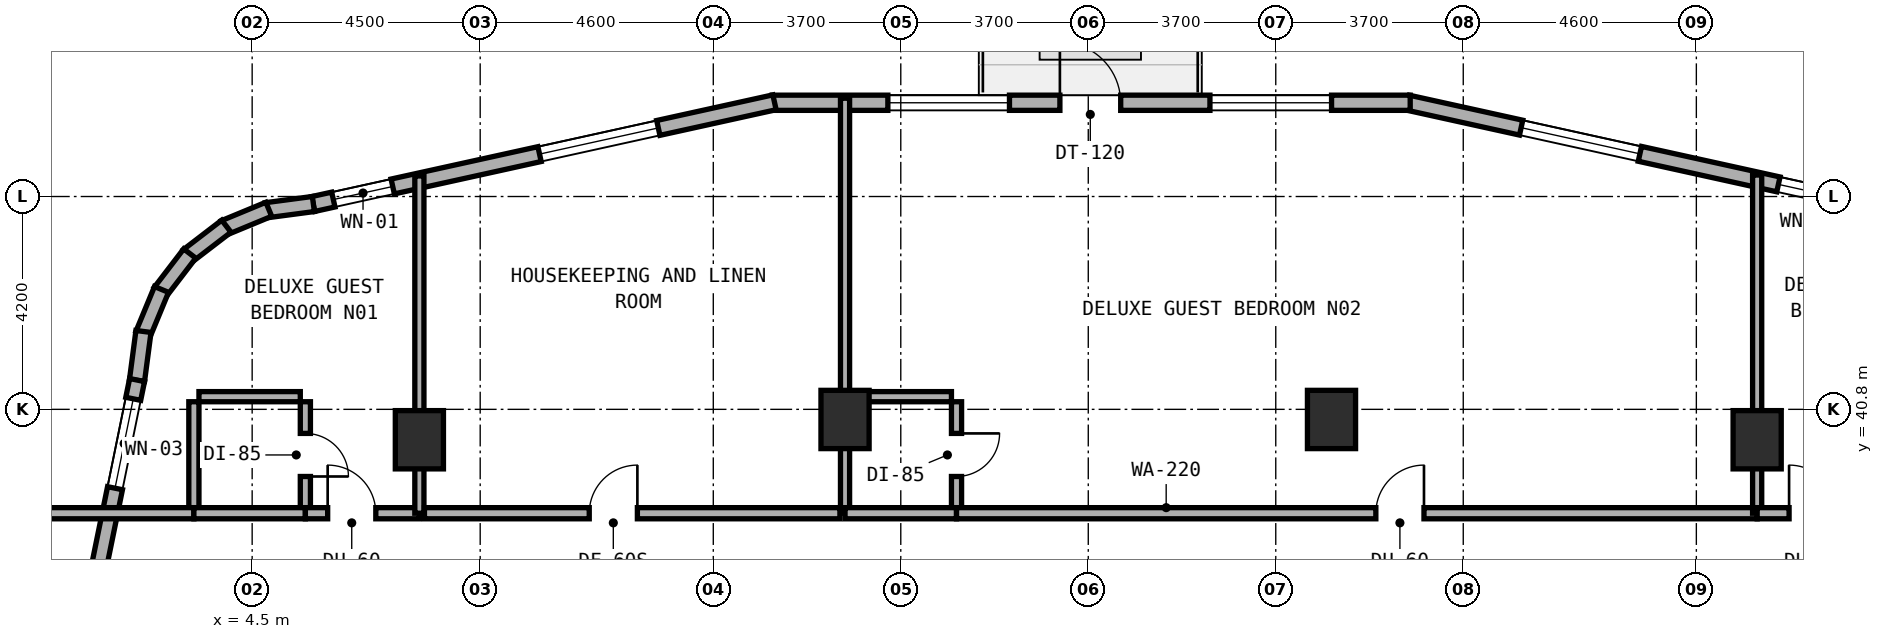
"""IFC4 building model, lengths in metres.
Left out: names, types, materials, properties, quantities, classifications, styles, units other than length and angle.
Written with IfcOpenShell. Run it as: python <this file> out.ifc"""

import sys

from ifc_helpers import new_model, si_unit, direction, frame, frame_2d, origin, origin_2d, place, context, subcontext, project, spatial, rectangle, extrude, element, fill, save


model = new_model("IFC4")
c1 = context("Model", 3, precision=1e-05, world=origin(), true_north=direction((0.0, 1.0)))
c2 = subcontext(c1, "Body", "Model", "MODEL_VIEW")
j1 = project(units=[si_unit("LENGTHUNIT", "METRE"), si_unit("PLANEANGLEUNIT", "RADIAN")], contexts=[c1])
p1 = place(None, origin())
s1 = spatial("IfcSite", under=j1, at=p1, CompositionType="ELEMENT")
p2 = place(p1, origin())
s2 = spatial("IfcBuilding", under=s1, at=p2, CompositionType="ELEMENT")
p3 = place(p2, frame((0.0, 0.0, 69.5)))
s3 = spatial("IfcBuildingStorey", under=s2, at=p3, CompositionType="ELEMENT", Elevation=69.5)
for number, where, z_axis, x_axis in (
    (1, (16.2, 40.6, 0.0), (0.0, 0.0, 1.0), (1.0, 0.0, 0.0)),
    (2, (25.8, 40.6, 0.0), (0.0, 0.0, 1.0), (1.0, 0.0, 0.0)),
    (3, (34.2, 40.2, 0.0), (0.0, 0.0, 1.0), (1.0, 0.0, 0.0)),
    (4, (7.8, 40.2, 0.0), (0.0, 0.0, 1.0), (1.0, 0.0, 0.0)),
):
    element("IfcColumn", number, at=place(p3, frame(where, z_axis=z_axis, x_axis=x_axis)), inside=s3, PredefinedType="COLUMN", context=c2, shape_type="SweptSolid", body=[
        extrude(rectangle(XDim=0.95, YDim=1.15, at=origin_2d()), origin(), (0.0, 0.0, 1.0), 3.5),
    ])
p4 = place(p3, frame((36.376, 44.852, 0.0), z_axis=(0.0, 0.0, 1.0), x_axis=(-0.976540764801, 0.215332614068, 0.0)))
e5 = element("IfcWall", 5, at=p4, inside=s3, PredefinedType="STANDARD", context=c2, shape_type="SweptSolid", body=[
    extrude(rectangle(XDim=9.288, YDim=0.3, at=frame_2d((4.644, 0.0))), origin(), (0.0, 0.0, 1.0), 3.22),
])
p5 = place(p4, frame((0.299, 0.0, 0.85)))
e6 = element("IfcOpeningElement", 6, at=p5, cuts=e5, PredefinedType="OPENING", context=c2, shape_type="SweptSolid", body=[
    extrude(rectangle(XDim=1.5, YDim=1.5, at=frame_2d((0.75, 0.75))), frame((0.0, 0.16, 0.0), z_axis=(0.0, -1.0, 0.0), x_axis=(1.0, 0.0, 0.0)), (0.0, 0.0, 1.0), 0.32),
])
p6 = place(p4, frame((4.598, 0.0, 0.8)))
e7 = element("IfcOpeningElement", 7, at=p6, cuts=e5, PredefinedType="OPENING", context=c2, shape_type="SweptSolid", body=[
    extrude(rectangle(XDim=2.4, YDim=1.6, at=frame_2d((1.2, 0.8))), frame((0.0, 0.16, 0.0), z_axis=(0.0, -1.0, 0.0), x_axis=(1.0, 0.0, 0.0)), (0.0, 0.0, 1.0), 0.32),
])
p7 = place(p3, frame((27.353, 46.85, 0.0), z_axis=(0.0, 0.0, 1.0), x_axis=(-1.0, 0.0, 0.0)))
e8 = element("IfcWall", 8, at=p7, inside=s3, PredefinedType="STANDARD", context=c2, shape_type="SweptSolid", body=[
    extrude(rectangle(XDim=12.591, YDim=0.3, at=frame_2d((6.295, 0.0))), origin(), (0.0, 0.0, 1.0), 3.22),
])
p8 = place(p7, frame((5.713, 0.0, 0.0)))
e9 = element("IfcOpeningElement", 9, at=p8, cuts=e8, PredefinedType="OPENING", context=c2, shape_type="SweptSolid", body=[
    extrude(rectangle(XDim=1.2, YDim=2.15, at=frame_2d((0.6, 1.075))), frame((0.0, 0.16, 0.0), z_axis=(0.0, -1.0, 0.0), x_axis=(1.0, 0.0, 0.0)), (0.0, 0.0, 1.0), 0.32),
])
p9 = place(p7, frame((1.552, 0.0, 0.8)))
e10 = element("IfcOpeningElement", 10, at=p9, cuts=e8, PredefinedType="OPENING", context=c2, shape_type="SweptSolid", body=[
    extrude(rectangle(XDim=2.4, YDim=1.6, at=frame_2d((1.2, 0.8))), frame((0.0, 0.16, 0.0), z_axis=(0.0, -1.0, 0.0), x_axis=(1.0, 0.0, 0.0)), (0.0, 0.0, 1.0), 0.32),
])
p10 = place(p7, frame((7.908, 0.0, 0.8)))
e11 = element("IfcOpeningElement", 11, at=p10, cuts=e8, PredefinedType="OPENING", context=c2, shape_type="SweptSolid", body=[
    extrude(rectangle(XDim=2.4, YDim=1.6, at=frame_2d((1.2, 0.8))), frame((0.0, 0.16, 0.0), z_axis=(0.0, -1.0, 0.0), x_axis=(1.0, 0.0, 0.0)), (0.0, 0.0, 1.0), 0.32),
])
p11 = place(p3, frame((14.808, 46.859, 0.0), z_axis=(0.0, 0.0, 1.0), x_axis=(-0.976555357219, -0.21526642629, 0.0)))
e12 = element("IfcWall", 12, at=p11, inside=s3, PredefinedType="STANDARD", context=c2, shape_type="SweptSolid", body=[
    extrude(rectangle(XDim=9.323, YDim=0.3, at=frame_2d((4.661, 0.0))), origin(), (0.0, 0.0, 1.0), 3.22),
])
p12 = place(p11, frame((2.348, 0.0, 0.8)))
e13 = element("IfcOpeningElement", 13, at=p12, cuts=e12, PredefinedType="OPENING", context=c2, shape_type="SweptSolid", body=[
    extrude(rectangle(XDim=2.4, YDim=1.6, at=frame_2d((1.2, 0.8))), frame((0.0, 0.16, 0.0), z_axis=(0.0, -1.0, 0.0), x_axis=(1.0, 0.0, 0.0)), (0.0, 0.0, 1.0), 0.32),
])
p13 = place(p11, frame((7.715, 0.0, 0.85)))
e14 = element("IfcOpeningElement", 14, at=p13, cuts=e12, PredefinedType="OPENING", context=c2, shape_type="SweptSolid", body=[
    extrude(rectangle(XDim=1.2, YDim=1.5, at=frame_2d((0.6, 0.75))), frame((0.0, 0.16, 0.0), z_axis=(0.0, -1.0, 0.0), x_axis=(1.0, 0.0, 0.0)), (0.0, 0.0, 1.0), 0.32),
])
p14 = place(p3, frame((5.708, 44.852, 0.0), z_axis=(0.0, 0.0, 1.0), x_axis=(-0.991359246108, -0.131174864804, 0.0)))
e15 = element("IfcWall", 15, at=p14, inside=s3, PredefinedType="STANDARD", context=c2, shape_type="SweptSolid", body=[
    extrude(rectangle(XDim=0.938, YDim=0.3, at=frame_2d((0.469, 0.0))), origin(), (0.0, 0.0, 1.0), 3.22),
])
p15 = place(p3, frame((4.828, 44.748, 0.0), z_axis=(0.0, 0.0, 1.0), x_axis=(-0.923982547689, -0.382434636986, 0.0)))
e16 = element("IfcWall", 16, at=p15, inside=s3, PredefinedType="STANDARD", context=c2, shape_type="SweptSolid", body=[
    extrude(rectangle(XDim=0.954, YDim=0.3, at=frame_2d((0.477, 0.0))), origin(), (0.0, 0.0, 1.0), 3.22),
])
for number, where, z_axis, x_axis in (
    (17, (3.991, 44.414, 0.0), (0.0, 0.0, 1.0), (-0.794, -0.608, 0.0)),
    (18, (3.268, 43.875, 0.0), (0.0, 0.0, 1.0), (-0.608, -0.794, 0.0)),
):
    element("IfcWall", number, at=place(p3, frame(where, z_axis=z_axis, x_axis=x_axis)), inside=s3, PredefinedType="STANDARD", context=c2, shape_type="SweptSolid", body=[
        extrude(rectangle(XDim=0.955, YDim=0.3, at=frame_2d((0.478, 0.0))), origin(), (0.0, 0.0, 1.0), 3.22),
    ])
p16 = place(p3, frame((2.711, 43.166, 0.0), z_axis=(0.0, 0.0, 1.0), x_axis=(-0.382344263057, -0.924019948111, 0.0)))
e19 = element("IfcWall", 19, at=p16, inside=s3, PredefinedType="STANDARD", context=c2, shape_type="SweptSolid", body=[
    extrude(rectangle(XDim=0.955, YDim=0.3, at=frame_2d((0.477, 0.0))), origin(), (0.0, 0.0, 1.0), 3.22),
])
p17 = place(p3, frame((2.355, 42.337, 0.0), z_axis=(0.0, 0.0, 1.0), x_axis=(-0.130454512571, -0.991454295543, 0.0)))
e20 = element("IfcWall", 20, at=p17, inside=s3, PredefinedType="STANDARD", context=c2, shape_type="SweptSolid", body=[
    extrude(rectangle(XDim=0.973, YDim=0.3, at=frame_2d((0.487, 0.0))), origin(), (0.0, 0.0, 1.0), 3.22),
])
p18 = place(p3, frame((2.229, 41.378, 0.0), z_axis=(0.0, 0.0, 1.0), x_axis=(-0.199990901713, -0.979797754249, 0.0)))
e21 = element("IfcWall", 21, at=p18, inside=s3, PredefinedType="STANDARD", context=c2, shape_type="SweptSolid", body=[
    extrude(rectangle(XDim=10.065, YDim=0.3, at=frame_2d((5.033, 0.0))), origin(), (0.0, 0.0, 1.0), 3.22),
])
p19 = place(p18, frame((0.378, 0.0, 0.85)))
e22 = element("IfcOpeningElement", 22, at=p19, cuts=e21, PredefinedType="OPENING", context=c2, shape_type="SweptSolid", body=[
    extrude(rectangle(XDim=1.8, YDim=1.5, at=frame_2d((0.9, 0.75))), frame((0.0, 0.16, 0.0), z_axis=(0.0, -1.0, 0.0), x_axis=(1.0, 0.0, 0.0)), (0.0, 0.0, 1.0), 0.32),
])
p20 = place(p18, frame((5.236, 0.0, 0.8)))
e23 = element("IfcOpeningElement", 23, at=p20, cuts=e21, PredefinedType="OPENING", context=c2, shape_type="SweptSolid", body=[
    extrude(rectangle(XDim=2.4, YDim=1.6, at=frame_2d((1.2, 0.8))), frame((0.0, 0.16, 0.0), z_axis=(0.0, -1.0, 0.0), x_axis=(1.0, 0.0, 0.0)), (0.0, 0.0, 1.0), 0.32),
])
p21 = place(p3, frame((5.55, 38.85, 0.0), z_axis=(0.0, 0.0, 1.0), x_axis=(0.0, 1.0, 0.0)))
e24 = element("IfcWall", 24, at=p21, inside=s3, PredefinedType="PLUMBINGWALL", context=c2, shape_type="SweptSolid", body=[
    extrude(rectangle(XDim=2.1, YDim=0.2, at=frame_2d((1.05, 0.0))), origin(), (0.0, 0.0, 1.0), 3.22),
])
p22 = place(p21, frame((0.625, 0.0, 0.0)))
e25 = element("IfcOpeningElement", 25, at=p22, cuts=e24, PredefinedType="OPENING", context=c2, shape_type="SweptSolid", body=[
    extrude(rectangle(XDim=0.85, YDim=2.1, at=frame_2d((0.425, 1.05))), frame((0.0, 0.11, 0.0), z_axis=(0.0, -1.0, 0.0), x_axis=(1.0, 0.0, 0.0)), (0.0, 0.0, 1.0), 0.22),
])
p23 = place(p3, frame((3.45, 41.05, 0.0), z_axis=(0.0, 0.0, 1.0), x_axis=(1.0, 0.0, 0.0)))
e26 = element("IfcWall", 26, at=p23, inside=s3, PredefinedType="PLUMBINGWALL", context=c2, shape_type="SweptSolid", body=[
    extrude(rectangle(XDim=2.0, YDim=0.2, at=frame_2d((1.0, 0.0))), origin(), (0.0, 0.0, 1.0), 3.22),
])
p24 = place(p3, frame((3.35, 38.85, 0.0), z_axis=(0.0, 0.0, 1.0), x_axis=(0.0, 1.0, 0.0)))
e27 = element("IfcWall", 27, at=p24, inside=s3, PredefinedType="PLUMBINGWALL", context=c2, shape_type="SweptSolid", body=[
    extrude(rectangle(XDim=2.1, YDim=0.2, at=frame_2d((1.05, 0.0))), origin(), (0.0, 0.0, 1.0), 3.22),
])
p25 = place(p3, frame((0.24, 38.75, 0.0), z_axis=(0.0, 0.0, 1.0), x_axis=(1.0, 0.0, 0.0)))
e28 = element("IfcWall", 28, at=p25, inside=s3, PredefinedType="SOLIDWALL", context=c2, shape_type="SweptSolid", body=[
    extrude(rectangle(XDim=3.11, YDim=0.22, at=frame_2d((1.555, 0.0))), origin(), (0.0, 0.0, 1.0), 3.22),
])
p26 = place(p3, frame((3.35, 38.75, 0.0), z_axis=(0.0, 0.0, 1.0), x_axis=(1.0, 0.0, 0.0)))
e29 = element("IfcWall", 29, at=p26, inside=s3, PredefinedType="SOLIDWALL", context=c2, shape_type="SweptSolid", body=[
    extrude(rectangle(XDim=2.2, YDim=0.22, at=frame_2d((1.1, 0.0))), origin(), (0.0, 0.0, 1.0), 3.22),
])
p27 = place(p3, frame((5.55, 38.75, 0.0), z_axis=(0.0, 0.0, 1.0), x_axis=(1.0, 0.0, 0.0)))
e30 = element("IfcWall", 30, at=p27, inside=s3, PredefinedType="SOLIDWALL", context=c2, shape_type="SweptSolid", body=[
    extrude(rectangle(XDim=2.25, YDim=0.22, at=frame_2d((1.125, 0.0))), origin(), (0.0, 0.0, 1.0), 2.495),
])
p28 = place(p27, frame((0.44, 0.0, 0.0)))
e31 = element("IfcOpeningElement", 31, at=p28, cuts=e30, PredefinedType="OPENING", context=c2, shape_type="SweptSolid", body=[
    extrude(rectangle(XDim=0.95, YDim=2.1, at=frame_2d((0.475, 1.05))), frame((0.0, 0.12, 0.0), z_axis=(0.0, -1.0, 0.0), x_axis=(1.0, 0.0, 0.0)), (0.0, 0.0, 1.0), 0.24),
])
p29 = place(p3, frame((7.8, 38.75, 0.0), z_axis=(0.0, 0.0, 1.0), x_axis=(0.0, 1.0, 0.0)))
e32 = element("IfcWall", 32, at=p29, inside=s3, PredefinedType="SOLIDWALL", context=c2, shape_type="SweptSolid", body=[
    extrude(rectangle(XDim=6.656, YDim=0.18, at=frame_2d((3.328, 0.0))), origin(), (0.0, 0.0, 1.0), 2.495),
])
p30 = place(p3, frame((7.9, 38.75, 0.0), z_axis=(0.0, 0.0, 1.0), x_axis=(1.0, 0.0, 0.0)))
e33 = element("IfcWall", 33, at=p30, inside=s3, PredefinedType="SOLIDWALL", context=c2, shape_type="SweptSolid", body=[
    extrude(rectangle(XDim=8.2, YDim=0.22, at=frame_2d((4.1, 0.0))), origin(), (0.0, 0.0, 1.0), 2.925),
])
p31 = place(p30, frame((3.252, 0.0, 0.0)))
e34 = element("IfcOpeningElement", 34, at=p31, cuts=e33, PredefinedType="OPENING", context=c2, shape_type="SweptSolid", body=[
    extrude(rectangle(XDim=0.95, YDim=2.1, at=frame_2d((0.475, 1.05))), frame((0.0, 0.12, 0.0), z_axis=(0.0, -1.0, 0.0), x_axis=(1.0, 0.0, 0.0)), (0.0, 0.0, 1.0), 0.24),
])
p32 = place(p3, frame((16.2, 38.75, 0.0), z_axis=(0.0, 0.0, 1.0), x_axis=(0.0, 1.0, 0.0)))
e35 = element("IfcWall", 35, at=p32, inside=s3, PredefinedType="SOLIDWALL", context=c2, shape_type="SweptSolid", body=[
    extrude(rectangle(XDim=8.19, YDim=0.18, at=frame_2d((4.095, 0.0))), origin(), (0.0, 0.0, 1.0), 2.495),
])
p33 = place(p3, frame((18.4, 38.85, 0.0), z_axis=(0.0, 0.0, 1.0), x_axis=(0.0, 1.0, 0.0)))
e36 = element("IfcWall", 36, at=p33, inside=s3, PredefinedType="PLUMBINGWALL", context=c2, shape_type="SweptSolid", body=[
    extrude(rectangle(XDim=2.1, YDim=0.2, at=frame_2d((1.05, 0.0))), origin(), (0.0, 0.0, 1.0), 2.745),
])
p34 = place(p33, frame((0.625, 0.0, 0.0)))
e37 = element("IfcOpeningElement", 37, at=p34, cuts=e36, PredefinedType="OPENING", context=c2, shape_type="SweptSolid", body=[
    extrude(rectangle(XDim=0.85, YDim=2.1, at=frame_2d((0.425, 1.05))), frame((0.0, 0.11, 0.0), z_axis=(0.0, -1.0, 0.0), x_axis=(1.0, 0.0, 0.0)), (0.0, 0.0, 1.0), 0.22),
])
p35 = place(p3, frame((16.3, 41.05, 0.0), z_axis=(0.0, 0.0, 1.0), x_axis=(1.0, 0.0, 0.0)))
e38 = element("IfcWall", 38, at=p35, inside=s3, PredefinedType="PLUMBINGWALL", context=c2, shape_type="SweptSolid", body=[
    extrude(rectangle(XDim=2.0, YDim=0.2, at=frame_2d((1.0, 0.0))), origin(), (0.0, 0.0, 1.0), 3.22),
])
p36 = place(p3, frame((16.2, 38.75, 0.0), z_axis=(0.0, 0.0, 1.0), x_axis=(1.0, 0.0, 0.0)))
e39 = element("IfcWall", 39, at=p36, inside=s3, PredefinedType="SOLIDWALL", context=c2, shape_type="SweptSolid", body=[
    extrude(rectangle(XDim=2.2, YDim=0.22, at=frame_2d((1.1, 0.0))), origin(), (0.0, 0.0, 1.0), 2.495),
])
p37 = place(p3, frame((18.4, 38.75, 0.0), z_axis=(0.0, 0.0, 1.0), x_axis=(1.0, 0.0, 0.0)))
e40 = element("IfcWall", 40, at=p37, inside=s3, PredefinedType="SOLIDWALL", context=c2, shape_type="SweptSolid", body=[
    extrude(rectangle(XDim=15.8, YDim=0.22, at=frame_2d((7.9, 0.0))), origin(), (0.0, 0.0, 1.0), 2.495),
])
p38 = place(p37, frame((8.275, 0.0, 0.0)))
e41 = element("IfcOpeningElement", 41, at=p38, cuts=e40, PredefinedType="OPENING", context=c2, shape_type="SweptSolid", body=[
    extrude(rectangle(XDim=0.95, YDim=2.1, at=frame_2d((0.475, 1.05))), frame((0.0, 0.12, 0.0), z_axis=(0.0, -1.0, 0.0), x_axis=(1.0, 0.0, 0.0)), (0.0, 0.0, 1.0), 0.24),
])
p39 = place(p3, frame((34.2, 38.75, 0.0), z_axis=(0.0, 0.0, 1.0), x_axis=(0.0, 1.0, 0.0)))
e42 = element("IfcWall", 42, at=p39, inside=s3, PredefinedType="SOLIDWALL", context=c2, shape_type="SweptSolid", body=[
    extrude(rectangle(XDim=6.674, YDim=0.18, at=frame_2d((3.337, 0.0))), origin(), (0.0, 0.0, 1.0), 2.495),
])
p40 = place(p3, frame((34.2, 38.75, 0.0), z_axis=(0.0, 0.0, 1.0), x_axis=(1.0, 0.0, 0.0)))
e43 = element("IfcWall", 43, at=p40, inside=s3, PredefinedType="SOLIDWALL", context=c2, shape_type="SweptSolid", body=[
    extrude(rectangle(XDim=2.25, YDim=0.22, at=frame_2d((1.125, 0.0))), origin(), (0.0, 0.0, 1.0), 2.495),
])
p41 = place(p40, frame((0.63, 0.0, 0.0)))
e44 = element("IfcOpeningElement", 44, at=p41, cuts=e43, PredefinedType="OPENING", context=c2, shape_type="SweptSolid", body=[
    extrude(rectangle(XDim=0.95, YDim=2.1, at=frame_2d((0.475, 1.05))), frame((0.0, 0.12, 0.0), z_axis=(0.0, -1.0, 0.0), x_axis=(1.0, 0.0, 0.0)), (0.0, 0.0, 1.0), 0.24),
])
p42 = place(p5, origin())
e45 = element("IfcWindow", 45, at=p42, inside=s3, PartitioningType="SINGLE_PANEL", PredefinedType="WINDOW", context=c2, shape_type="SweptSolid", body=[
    extrude(rectangle(XDim=1.5, YDim=1.5, at=frame_2d((0.75, 0.75))), frame((0.0, 0.03, 0.0), z_axis=(0.0, -1.0, 0.0), x_axis=(1.0, 0.0, 0.0)), (0.0, 0.0, 1.0), 0.06),
])
fill(e6, e45)
p43 = place(p6, origin())
e46 = element("IfcWindow", 46, at=p43, inside=s3, PartitioningType="SINGLE_PANEL", PredefinedType="WINDOW", context=c2, shape_type="SweptSolid", body=[
    extrude(rectangle(XDim=2.4, YDim=1.6, at=frame_2d((1.2, 0.8))), frame((0.0, 0.03, 0.0), z_axis=(0.0, -1.0, 0.0), x_axis=(1.0, 0.0, 0.0)), (0.0, 0.0, 1.0), 0.06),
])
fill(e7, e46)
p44 = place(p8, frame((1.2, 0.0, 0.0), z_axis=(0.0, 0.0, 1.0), x_axis=(-1.0, 0.0, 0.0)))
e47 = element("IfcDoor", 47, at=p44, inside=s3, OperationType="SINGLE_SWING_LEFT", PredefinedType="DOOR", context=c2, shape_type="SweptSolid", body=[
    extrude(rectangle(XDim=1.2, YDim=2.15, at=frame_2d((0.6, 1.075))), frame((0.0, 0.025, 0.0), z_axis=(0.0, -1.0, 0.0), x_axis=(1.0, 0.0, 0.0)), (0.0, 0.0, 1.0), 0.05),
])
fill(e9, e47)
p45 = place(p9, origin())
e48 = element("IfcWindow", 48, at=p45, inside=s3, PartitioningType="SINGLE_PANEL", PredefinedType="WINDOW", context=c2, shape_type="SweptSolid", body=[
    extrude(rectangle(XDim=2.4, YDim=1.6, at=frame_2d((1.2, 0.8))), frame((0.0, 0.03, 0.0), z_axis=(0.0, -1.0, 0.0), x_axis=(1.0, 0.0, 0.0)), (0.0, 0.0, 1.0), 0.06),
])
fill(e10, e48)
p46 = place(p10, origin())
e49 = element("IfcWindow", 49, at=p46, inside=s3, PartitioningType="SINGLE_PANEL", PredefinedType="WINDOW", context=c2, shape_type="SweptSolid", body=[
    extrude(rectangle(XDim=2.4, YDim=1.6, at=frame_2d((1.2, 0.8))), frame((0.0, 0.03, 0.0), z_axis=(0.0, -1.0, 0.0), x_axis=(1.0, 0.0, 0.0)), (0.0, 0.0, 1.0), 0.06),
])
fill(e11, e49)
p47 = place(p12, origin())
e50 = element("IfcWindow", 50, at=p47, inside=s3, PartitioningType="SINGLE_PANEL", PredefinedType="WINDOW", context=c2, shape_type="SweptSolid", body=[
    extrude(rectangle(XDim=2.4, YDim=1.6, at=frame_2d((1.2, 0.8))), frame((0.0, 0.03, 0.0), z_axis=(0.0, -1.0, 0.0), x_axis=(1.0, 0.0, 0.0)), (0.0, 0.0, 1.0), 0.06),
])
fill(e13, e50)
p48 = place(p13, origin())
e51 = element("IfcWindow", 51, at=p48, inside=s3, PartitioningType="SINGLE_PANEL", PredefinedType="WINDOW", context=c2, shape_type="SweptSolid", body=[
    extrude(rectangle(XDim=1.2, YDim=1.5, at=frame_2d((0.6, 0.75))), frame((0.0, 0.03, 0.0), z_axis=(0.0, -1.0, 0.0), x_axis=(1.0, 0.0, 0.0)), (0.0, 0.0, 1.0), 0.06),
])
fill(e14, e51)
p49 = place(p19, origin())
e52 = element("IfcWindow", 52, at=p49, inside=s3, PartitioningType="SINGLE_PANEL", PredefinedType="WINDOW", context=c2, shape_type="SweptSolid", body=[
    extrude(rectangle(XDim=1.8, YDim=1.5, at=frame_2d((0.9, 0.75))), frame((0.0, 0.03, 0.0), z_axis=(0.0, -1.0, 0.0), x_axis=(1.0, 0.0, 0.0)), (0.0, 0.0, 1.0), 0.06),
])
fill(e22, e52)
p50 = place(p22, frame((0.85, 0.0, 0.0), z_axis=(0.0, 0.0, 1.0), x_axis=(-1.0, 0.0, 0.0)))
e53 = element("IfcDoor", 53, at=p50, inside=s3, OperationType="SINGLE_SWING_RIGHT", PredefinedType="DOOR", context=c2, shape_type="SweptSolid", body=[
    extrude(rectangle(XDim=0.85, YDim=2.1, at=frame_2d((0.425, 1.05))), frame((0.0, 0.025, 0.0), z_axis=(0.0, -1.0, 0.0), x_axis=(1.0, 0.0, 0.0)), (0.0, 0.0, 1.0), 0.05),
])
fill(e25, e53)
p51 = place(p28, origin())
e54 = element("IfcDoor", 54, at=p51, inside=s3, OperationType="SINGLE_SWING_LEFT", PredefinedType="DOOR", context=c2, shape_type="SweptSolid", body=[
    extrude(rectangle(XDim=0.95, YDim=2.1, at=frame_2d((0.475, 1.05))), frame((0.0, 0.025, 0.0), z_axis=(0.0, -1.0, 0.0), x_axis=(1.0, 0.0, 0.0)), (0.0, 0.0, 1.0), 0.05),
])
fill(e31, e54)
p52 = place(p31, origin())
e55 = element("IfcDoor", 55, at=p52, inside=s3, OperationType="SINGLE_SWING_RIGHT", PredefinedType="DOOR", context=c2, shape_type="SweptSolid", body=[
    extrude(rectangle(XDim=0.95, YDim=2.1, at=frame_2d((0.475, 1.05))), frame((0.0, 0.025, 0.0), z_axis=(0.0, -1.0, 0.0), x_axis=(1.0, 0.0, 0.0)), (0.0, 0.0, 1.0), 0.05),
])
fill(e34, e55)
p53 = place(p34, frame((0.85, 0.0, 0.0), z_axis=(0.0, 0.0, 1.0), x_axis=(-1.0, 0.0, 0.0)))
e56 = element("IfcDoor", 56, at=p53, inside=s3, OperationType="SINGLE_SWING_LEFT", PredefinedType="DOOR", context=c2, shape_type="SweptSolid", body=[
    extrude(rectangle(XDim=0.85, YDim=2.1, at=frame_2d((0.425, 1.05))), frame((0.0, 0.025, 0.0), z_axis=(0.0, -1.0, 0.0), x_axis=(1.0, 0.0, 0.0)), (0.0, 0.0, 1.0), 0.05),
])
fill(e37, e56)
p54 = place(p38, origin())
e57 = element("IfcDoor", 57, at=p54, inside=s3, OperationType="SINGLE_SWING_RIGHT", PredefinedType="DOOR", context=c2, shape_type="SweptSolid", body=[
    extrude(rectangle(XDim=0.95, YDim=2.1, at=frame_2d((0.475, 1.05))), frame((0.0, 0.025, 0.0), z_axis=(0.0, -1.0, 0.0), x_axis=(1.0, 0.0, 0.0)), (0.0, 0.0, 1.0), 0.05),
])
fill(e41, e57)
p55 = place(p41, origin())
e58 = element("IfcDoor", 58, at=p55, inside=s3, OperationType="SINGLE_SWING_LEFT", PredefinedType="DOOR", context=c2, shape_type="SweptSolid", body=[
    extrude(rectangle(XDim=0.95, YDim=2.1, at=frame_2d((0.475, 1.05))), frame((0.0, 0.025, 0.0), z_axis=(0.0, -1.0, 0.0), x_axis=(1.0, 0.0, 0.0)), (0.0, 0.0, 1.0), 0.05),
])
fill(e44, e58)
save(model, sys.argv[1])
